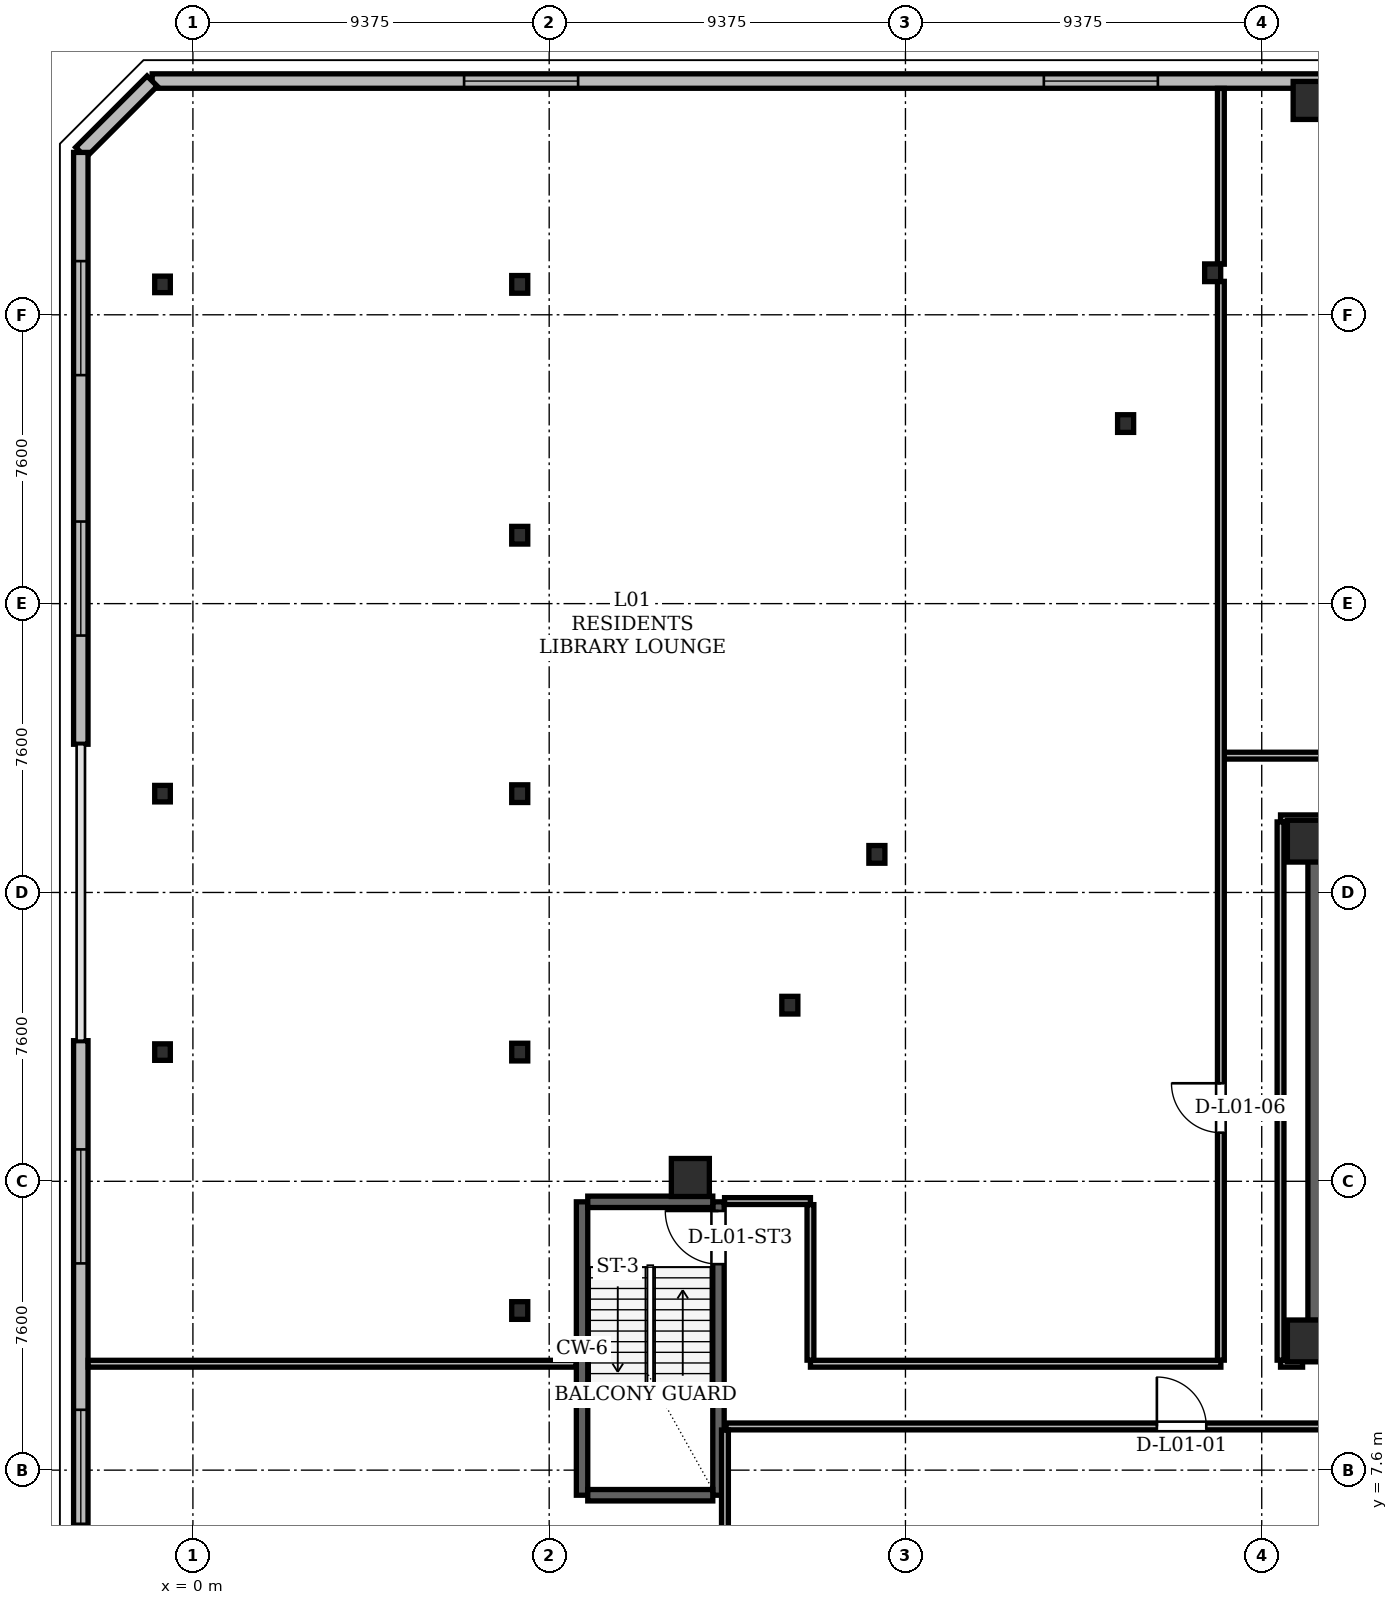
"""IFC4 building model, lengths in metres.
Left out: names, types, materials, properties, quantities, classifications, styles, units other than length and angle.
Written with IfcOpenShell. Run it as: python <this file> out.ifc"""

import sys

from ifc_helpers import new_model, si_unit, direction, frame, frame_2d, origin, origin_2d, place, context, subcontext, project, spatial, rectangle, hollow_rectangle, i_section, extrude, element, fill, save


model = new_model("IFC4")
c1 = context("Model", 3, precision=1e-05, world=origin(), true_north=direction((0.0, 1.0)))
c2 = subcontext(c1, "Body", "Model", "MODEL_VIEW")
j1 = project(units=[si_unit("LENGTHUNIT", "METRE"), si_unit("PLANEANGLEUNIT", "RADIAN")], contexts=[c1])
p1 = place(None, origin())
s1 = spatial("IfcSite", under=j1, at=p1, CompositionType="ELEMENT")
p2 = place(p1, origin())
s2 = spatial("IfcBuilding", under=s1, at=p2, CompositionType="ELEMENT")
p3 = place(p2, frame((0.0, 0.0, 5.4)))
s3 = spatial("IfcBuildingStorey", under=s2, at=p3, CompositionType="ELEMENT", Elevation=5.4)
for number, where, z_axis, x_axis in (
    (1, (29.35, 11.0, 0.0), (0.0, 0.0, 1.0), (1.0, 0.0, 0.0)),
    (2, (29.35, 24.15, 0.0), (0.0, 0.0, 1.0), (1.0, 0.0, 0.0)),
):
    element("IfcColumn", number, at=place(p3, frame(where, z_axis=z_axis, x_axis=x_axis)), inside=s3, PredefinedType="COLUMN", context=c2, shape_type="SweptSolid", body=[
        extrude(hollow_rectangle(XDim=1.1, YDim=1.1, WallThickness=0.09, at=origin_2d()), origin(), (0.0, 0.0, 1.0), 4.5),
    ])
for number, where, z_axis, x_axis in (
    (3, (13.09, 15.3, 0.005), (0.0, 0.0, 1.0), (1.0, 0.0, 0.0)),
    (4, (29.452, 43.64, 0.005), (0.0, 0.0, 1.0), (1.0, 0.0, 0.0)),
):
    element("IfcColumn", number, at=place(p3, frame(where, z_axis=z_axis, x_axis=x_axis)), inside=s3, PredefinedType="COLUMN", context=c2, shape_type="SweptSolid", body=[
        extrude(hollow_rectangle(XDim=1.0, YDim=1.0, WallThickness=0.085, at=origin_2d()), origin(), (0.0, 0.0, 1.0), 4.491),
    ])
for number, where, z_axis, x_axis in (
    (5, (26.834, 39.106, 0.005), (0.0, 0.0, 1.0), (1.0, 0.0, 0.0)),
    (6, (24.543, 35.138, 0.005), (0.0, 0.0, 1.0), (1.0, 0.0, 0.0)),
    (7, (17.998, 23.802, 0.005), (0.0, 0.0, 1.0), (1.0, 0.0, 0.0)),
    (8, (15.708, 19.834, 0.005), (0.0, 0.0, 1.0), (1.0, 0.0, 0.0)),
):
    element("IfcColumn", number, at=place(p3, frame(where, z_axis=z_axis, x_axis=x_axis)), inside=s3, PredefinedType="COLUMN", context=c2, shape_type="SweptSolid", body=[
        extrude(i_section(OverallWidth=0.422, OverallDepth=0.465, WebThickness=0.045, FlangeThickness=0.072, at=origin_2d()), origin(), (0.0, 0.0, 1.0), 4.491),
    ])
for number, where, z_axis, x_axis in (
    (9, (8.6, 11.8, 0.0), (0.0, 0.0, 1.0), (1.0, 0.0, 0.0)),
    (10, (8.6, 18.6, 0.0), (0.0, 0.0, 1.0), (1.0, 0.0, 0.0)),
    (11, (8.6, 25.4, 0.0), (0.0, 0.0, 1.0), (1.0, 0.0, 0.0)),
    (12, (8.6, 32.2, 0.0), (0.0, 0.0, 1.0), (1.0, 0.0, 0.0)),
    (13, (8.6, 38.8, 0.0), (0.0, 0.0, 1.0), (1.0, 0.0, 0.0)),
):
    element("IfcColumn", number, at=place(p3, frame(where, z_axis=z_axis, x_axis=x_axis)), inside=s3, PredefinedType="COLUMN", context=c2, shape_type="SweptSolid", body=[
        extrude(i_section(OverallWidth=0.422, OverallDepth=0.465, WebThickness=0.045, FlangeThickness=0.072, at=origin_2d()), origin(), (0.0, 0.0, 1.0), 4.5),
    ])
for number, where, z_axis, x_axis in (
    (14, (-0.8, 18.6, 0.0), (0.0, 0.0, 1.0), (1.0, 0.0, 0.0)),
    (15, (-0.8, 25.4, 0.0), (0.0, 0.0, 1.0), (1.0, 0.0, 0.0)),
    (16, (-0.8, 38.8, 0.0), (0.0, 0.0, 1.0), (1.0, 0.0, 0.0)),
):
    element("IfcColumn", number, at=place(p3, frame(where, z_axis=z_axis, x_axis=x_axis)), inside=s3, PredefinedType="COLUMN", context=c2, shape_type="SweptSolid", body=[
        extrude(i_section(OverallWidth=0.411, OverallDepth=0.434, WebThickness=0.036, FlangeThickness=0.057, at=origin_2d()), origin(), (0.0, 0.0, 1.0), 4.5),
    ])
p4 = place(p3, frame((29.64, 11.0, 0.0), z_axis=(0.0, 0.0, 1.0), x_axis=(0.0, 1.0, 0.0)))
e17 = element("IfcWall", 17, at=p4, inside=s3, PredefinedType="SHEAR", context=c2, shape_type="SweptSolid", body=[
    extrude(rectangle(XDim=13.3, YDim=0.6, at=frame_2d((6.65, 0.0))), origin(), (0.0, 0.0, 1.0), 4.22),
])
p5 = place(p3, frame((29.35, 11.24, 0.0), z_axis=(0.0, 0.0, 1.0), x_axis=(1.0, 0.0, 0.0)))
e18 = element("IfcWall", 18, at=p5, inside=s3, PredefinedType="SHEAR", context=c2, shape_type="SweptSolid", body=[
    extrude(rectangle(XDim=7.1, YDim=0.6, at=frame_2d((3.55, 0.0))), origin(), (0.0, 0.0, 1.0), 4.22),
])
p6 = place(p3, frame((10.24, 6.94, 0.0), z_axis=(0.0, 0.0, 1.0), x_axis=(0.0, 1.0, 0.0)))
e19 = element("IfcWall", 19, at=p6, inside=s3, PredefinedType="SHEAR", context=c2, shape_type="SweptSolid", body=[
    extrude(rectangle(XDim=7.72, YDim=0.3, at=frame_2d((3.86, 0.0))), origin(), (0.0, 0.0, 1.0), 4.22),
])
p7 = place(p3, frame((13.83, 6.94, 0.0), z_axis=(0.0, 0.0, 1.0), x_axis=(0.0, 1.0, 0.0)))
e20 = element("IfcWall", 20, at=p7, inside=s3, PredefinedType="SHEAR", context=c2, shape_type="SweptSolid", body=[
    extrude(rectangle(XDim=7.72, YDim=0.3, at=frame_2d((3.86, 0.0))), origin(), (0.0, 0.0, 1.0), 4.22),
])
p8 = place(p7, frame((6.08, 0.0, 0.0)))
e21 = element("IfcOpeningElement", 21, at=p8, cuts=e20, PredefinedType="OPENING", context=c2, shape_type="SweptSolid", body=[
    extrude(rectangle(XDim=1.4, YDim=2.2, at=frame_2d((0.7, 1.1))), frame((0.0, 0.15, 0.0), z_axis=(0.0, -1.0, 0.0), x_axis=(1.0, 0.0, 0.0)), (0.0, 0.0, 1.0), 0.3),
])
for number, where, z_axis, x_axis in (
    (22, (10.39, 6.94, 0.0), (0.0, 0.0, 1.0), (1.0, 0.0, 0.0)),
    (23, (10.39, 14.66, 0.0), (0.0, 0.0, 1.0), (1.0, 0.0, 0.0)),
):
    element("IfcWall", number, at=place(p3, frame(where, z_axis=z_axis, x_axis=x_axis)), inside=s3, PredefinedType="SHEAR", context=c2, shape_type="SweptSolid", body=[
        extrude(rectangle(XDim=3.29, YDim=0.3, at=frame_2d((1.645, 0.0))), origin(), (0.0, 0.0, 1.0), 4.22),
    ])
p9 = place(p3, frame((33.6, 44.15, 0.0), z_axis=(0.0, 0.0, 1.0), x_axis=(-1.0, 0.0, 0.0)))
e24 = element("IfcWall", 24, at=p9, inside=s3, PredefinedType="SOLIDWALL", context=c2, shape_type="SweptSolid", body=[
    extrude(rectangle(XDim=34.672, YDim=0.38, at=frame_2d((17.336, 0.0))), origin(), (0.0, 0.0, 1.0), 4.22),
])
p10 = place(p9, frame((8.208, 0.0, 0.85)))
e25 = element("IfcOpeningElement", 25, at=p10, cuts=e24, PredefinedType="OPENING", context=c2, shape_type="SweptSolid", body=[
    extrude(rectangle(XDim=3.0, YDim=2.25, at=frame_2d((1.5, 1.125))), frame((0.0, 0.19, 0.0), z_axis=(0.0, -1.0, 0.0), x_axis=(1.0, 0.0, 0.0)), (0.0, 0.0, 1.0), 0.38),
])
p11 = place(p9, frame((23.464, 0.0, 0.85)))
e26 = element("IfcOpeningElement", 26, at=p11, cuts=e24, PredefinedType="OPENING", context=c2, shape_type="SweptSolid", body=[
    extrude(rectangle(XDim=3.0, YDim=2.25, at=frame_2d((1.5, 1.125))), frame((0.0, 0.19, 0.0), z_axis=(0.0, -1.0, 0.0), x_axis=(1.0, 0.0, 0.0)), (0.0, 0.0, 1.0), 0.38),
])
p12 = place(p3, frame((-1.072, 44.15, 0.0), z_axis=(0.0, 0.0, 1.0), x_axis=(-0.707106781187, -0.707106781187, 0.0)))
e27 = element("IfcWall", 27, at=p12, inside=s3, PredefinedType="SOLIDWALL", context=c2, shape_type="SweptSolid", body=[
    extrude(rectangle(XDim=2.656, YDim=0.38, at=frame_2d((1.328, 0.0))), origin(), (0.0, 0.0, 1.0), 4.22),
])
p13 = place(p3, frame((-2.95, 42.272, 0.0), z_axis=(0.0, 0.0, 1.0), x_axis=(0.0, -1.0, 0.0)))
e28 = element("IfcWall", 28, at=p13, inside=s3, PredefinedType="SOLIDWALL", context=c2, shape_type="SweptSolid", body=[
    extrude(rectangle(XDim=15.572, YDim=0.38, at=frame_2d((7.786, 0.0))), origin(), (0.0, 0.0, 1.0), 4.22),
])
p14 = place(p13, frame((2.86, 0.0, 0.85)))
e29 = element("IfcOpeningElement", 29, at=p14, cuts=e28, PredefinedType="OPENING", context=c2, shape_type="SweptSolid", body=[
    extrude(rectangle(XDim=3.0, YDim=2.25, at=frame_2d((1.5, 1.125))), frame((0.0, 0.19, 0.0), z_axis=(0.0, -1.0, 0.0), x_axis=(1.0, 0.0, 0.0)), (0.0, 0.0, 1.0), 0.38),
])
p15 = place(p13, frame((9.712, 0.0, 0.85)))
e30 = element("IfcOpeningElement", 30, at=p15, cuts=e28, PredefinedType="OPENING", context=c2, shape_type="SweptSolid", body=[
    extrude(rectangle(XDim=3.0, YDim=2.25, at=frame_2d((1.5, 1.125))), frame((0.0, 0.19, 0.0), z_axis=(0.0, -1.0, 0.0), x_axis=(1.0, 0.0, 0.0)), (0.0, 0.0, 1.0), 0.38),
])
p16 = place(p3, frame((-2.95, 18.9, 0.0), z_axis=(0.0, 0.0, 1.0), x_axis=(0.0, -1.0, 0.0)))
e31 = element("IfcWall", 31, at=p16, inside=s3, PredefinedType="SOLIDWALL", context=c2, shape_type="SweptSolid", body=[
    extrude(rectangle(XDim=15.572, YDim=0.38, at=frame_2d((7.786, 0.0))), origin(), (0.0, 0.0, 1.0), 4.22),
])
p17 = place(p16, frame((2.86, 0.0, 0.85)))
e32 = element("IfcOpeningElement", 32, at=p17, cuts=e31, PredefinedType="OPENING", context=c2, shape_type="SweptSolid", body=[
    extrude(rectangle(XDim=3.0, YDim=2.25, at=frame_2d((1.5, 1.125))), frame((0.0, 0.19, 0.0), z_axis=(0.0, -1.0, 0.0), x_axis=(1.0, 0.0, 0.0)), (0.0, 0.0, 1.0), 0.38),
])
p18 = place(p16, frame((9.712, 0.0, 0.85)))
e33 = element("IfcOpeningElement", 33, at=p18, cuts=e31, PredefinedType="OPENING", context=c2, shape_type="SweptSolid", body=[
    extrude(rectangle(XDim=3.0, YDim=2.25, at=frame_2d((1.5, 1.125))), frame((0.0, 0.19, 0.0), z_axis=(0.0, -1.0, 0.0), x_axis=(1.0, 0.0, 0.0)), (0.0, 0.0, 1.0), 0.38),
])
p19 = place(p3, frame((14.03, 8.75, 0.0), z_axis=(0.0, 0.0, 1.0), x_axis=(1.0, 0.0, 0.0)))
e34 = element("IfcWall", 34, at=p19, inside=s3, PredefinedType="PARTITIONING", context=c2, shape_type="SweptSolid", body=[
    extrude(rectangle(XDim=41.57, YDim=0.18, at=frame_2d((20.785, 0.0))), origin(), (0.0, 0.0, 1.0), 3.283),
])
p20 = place(p19, frame((11.336, 0.0, 0.0)))
e35 = element("IfcOpeningElement", 35, at=p20, cuts=e34, PredefinedType="OPENING", context=c2, shape_type="SweptSolid", body=[
    extrude(rectangle(XDim=1.3, YDim=2.2, at=frame_2d((0.65, 1.1))), frame((0.0, 0.09, 0.0), z_axis=(0.0, -1.0, 0.0), x_axis=(1.0, 0.0, 0.0)), (0.0, 0.0, 1.0), 0.18),
])
p21 = place(p19, frame((32.094, 0.0, 0.0)))
e36 = element("IfcOpeningElement", 36, at=p21, cuts=e34, PredefinedType="OPENING", context=c2, shape_type="SweptSolid", body=[
    extrude(rectangle(XDim=1.3, YDim=2.2, at=frame_2d((0.65, 1.1))), frame((0.0, 0.09, 0.0), z_axis=(0.0, -1.0, 0.0), x_axis=(1.0, 0.0, 0.0)), (0.0, 0.0, 1.0), 0.18),
])
p22 = place(p3, frame((-2.756, 10.4, 0.0), z_axis=(0.0, 0.0, 1.0), x_axis=(1.0, 0.0, 0.0)))
e37 = element("IfcWall", 37, at=p22, inside=s3, PredefinedType="PARTITIONING", context=c2, shape_type="SweptSolid", body=[
    extrude(rectangle(XDim=12.836, YDim=0.18, at=frame_2d((6.418, 0.0))), origin(), (0.0, 0.0, 1.0), 2.53),
])
p23 = place(p3, frame((16.25, 10.4, 0.0), z_axis=(0.0, 0.0, 1.0), x_axis=(1.0, 0.0, 0.0)))
e38 = element("IfcWall", 38, at=p23, inside=s3, PredefinedType="PARTITIONING", context=c2, shape_type="SweptSolid", body=[
    extrude(rectangle(XDim=10.8, YDim=0.18, at=frame_2d((5.4, 0.0))), origin(), (0.0, 0.0, 1.0), 4.22),
])
p24 = place(p3, frame((28.62, 10.4, 0.0), z_axis=(0.0, 0.0, 1.0), x_axis=(1.0, 0.0, 0.0)))
e39 = element("IfcWall", 39, at=p24, inside=s3, PredefinedType="PARTITIONING", context=c2, shape_type="SweptSolid", body=[
    extrude(rectangle(XDim=0.58, YDim=0.18, at=frame_2d((0.29, 0.0))), origin(), (0.0, 0.0, 1.0), 3.283),
])
p25 = place(p3, frame((13.99, 14.68, 0.0), z_axis=(0.0, 0.0, 1.0), x_axis=(1.0, 0.0, 0.0)))
e40 = element("IfcWall", 40, at=p25, inside=s3, PredefinedType="PARTITIONING", context=c2, shape_type="SweptSolid", body=[
    extrude(rectangle(XDim=2.26, YDim=0.18, at=frame_2d((1.13, 0.0))), origin(), (0.0, 0.0, 1.0), 3.283),
])
p26 = place(p3, frame((28.62, 24.75, 0.0), z_axis=(0.0, 0.0, 1.0), x_axis=(1.0, 0.0, 0.0)))
e41 = element("IfcWall", 41, at=p26, inside=s3, PredefinedType="PARTITIONING", context=c2, shape_type="SweptSolid", body=[
    extrude(rectangle(XDim=17.76, YDim=0.18, at=frame_2d((8.88, 0.0))), origin(), (0.0, 0.0, 1.0), 3.283),
])
p27 = place(p3, frame((27.05, 26.4, 0.0), z_axis=(0.0, 0.0, 1.0), x_axis=(1.0, 0.0, 0.0)))
e42 = element("IfcWall", 42, at=p27, inside=s3, PredefinedType="PARTITIONING", context=c2, shape_type="SweptSolid", body=[
    extrude(rectangle(XDim=28.55, YDim=0.18, at=frame_2d((14.275, 0.0))), origin(), (0.0, 0.0, 1.0), 3.283),
])
p28 = place(p27, frame((7.425, 0.0, 0.0)))
e43 = element("IfcOpeningElement", 43, at=p28, cuts=e42, PredefinedType="OPENING", context=c2, shape_type="SweptSolid", body=[
    extrude(rectangle(XDim=1.3, YDim=2.2, at=frame_2d((0.65, 1.1))), frame((0.0, 0.09, 0.0), z_axis=(0.0, -1.0, 0.0), x_axis=(1.0, 0.0, 0.0)), (0.0, 0.0, 1.0), 0.18),
])
p29 = place(p27, frame((18.437, 0.0, 0.0)))
e44 = element("IfcOpeningElement", 44, at=p29, cuts=e42, PredefinedType="OPENING", context=c2, shape_type="SweptSolid", body=[
    extrude(rectangle(XDim=0.88, YDim=2.08, at=frame_2d((0.44, 1.04))), frame((0.0, 0.09, 0.0), z_axis=(0.0, -1.0, 0.0), x_axis=(1.0, 0.0, 0.0)), (0.0, 0.0, 1.0), 0.18),
])
p30 = place(p27, frame((23.736, 0.0, 0.0)))
e45 = element("IfcOpeningElement", 45, at=p30, cuts=e42, PredefinedType="OPENING", context=c2, shape_type="SweptSolid", body=[
    extrude(rectangle(XDim=0.88, YDim=2.08, at=frame_2d((0.44, 1.04))), frame((0.0, 0.09, 0.0), z_axis=(0.0, -1.0, 0.0), x_axis=(1.0, 0.0, 0.0)), (0.0, 0.0, 1.0), 0.18),
])
p31 = place(p3, frame((14.0, 1.644, 0.0), z_axis=(0.0, 0.0, 1.0), x_axis=(0.0, 1.0, 0.0)))
e46 = element("IfcWall", 46, at=p31, inside=s3, PredefinedType="PARTITIONING", context=c2, shape_type="SweptSolid", body=[
    extrude(rectangle(XDim=7.012, YDim=0.18, at=frame_2d((3.506, 0.0))), origin(), (0.0, 0.0, 1.0), 4.22),
])
p32 = place(p3, frame((16.25, 10.494, 0.0), z_axis=(0.0, 0.0, 1.0), x_axis=(0.0, 1.0, 0.0)))
e47 = element("IfcWall", 47, at=p32, inside=s3, PredefinedType="PARTITIONING", context=c2, shape_type="SweptSolid", body=[
    extrude(rectangle(XDim=4.092, YDim=0.18, at=frame_2d((2.046, 0.0))), origin(), (0.0, 0.0, 1.0), 3.283),
])
p33 = place(p3, frame((27.05, 10.494, 0.0), z_axis=(0.0, 0.0, 1.0), x_axis=(0.0, 1.0, 0.0)))
e48 = element("IfcWall", 48, at=p33, inside=s3, PredefinedType="PARTITIONING", context=c2, shape_type="SweptSolid", body=[
    extrude(rectangle(XDim=28.386, YDim=0.18, at=frame_2d((14.193, 0.0))), origin(), (0.0, 0.0, 1.0), 3.283),
])
p34 = place(p33, frame((5.985, 0.0, 0.0)))
e49 = element("IfcOpeningElement", 49, at=p34, cuts=e48, PredefinedType="OPENING", context=c2, shape_type="SweptSolid", body=[
    extrude(rectangle(XDim=1.3, YDim=2.2, at=frame_2d((0.65, 1.1))), frame((0.0, 0.09, 0.0), z_axis=(0.0, -1.0, 0.0), x_axis=(1.0, 0.0, 0.0)), (0.0, 0.0, 1.0), 0.18),
])
p35 = place(p3, frame((27.05, 39.332, 0.0), z_axis=(0.0, 0.0, 1.0), x_axis=(0.0, 1.0, 0.0)))
e50 = element("IfcWall", 50, at=p35, inside=s3, PredefinedType="PARTITIONING", context=c2, shape_type="SweptSolid", body=[
    extrude(rectangle(XDim=4.625, YDim=0.18, at=frame_2d((2.312, 0.0))), origin(), (0.0, 0.0, 1.0), 3.354),
])
p36 = place(p3, frame((28.62, 10.494, 0.0), z_axis=(0.0, 0.0, 1.0), x_axis=(0.0, 1.0, 0.0)))
e51 = element("IfcWall", 51, at=p36, inside=s3, PredefinedType="PARTITIONING", context=c2, shape_type="SweptSolid", body=[
    extrude(rectangle(XDim=14.162, YDim=0.18, at=frame_2d((7.081, 0.0))), origin(), (0.0, 0.0, 1.0), 3.283),
])
p37 = place(p10, origin())
e52 = element("IfcWindow", 52, at=p37, inside=s3, PartitioningType="SINGLE_PANEL", PredefinedType="WINDOW", context=c2, shape_type="SweptSolid", body=[
    extrude(rectangle(XDim=3.0, YDim=2.25, at=frame_2d((1.5, 1.125))), frame((0.0, 0.03, 0.0), z_axis=(0.0, -1.0, 0.0), x_axis=(1.0, 0.0, 0.0)), (0.0, 0.0, 1.0), 0.06),
])
fill(e25, e52)
p38 = place(p11, origin())
e53 = element("IfcWindow", 53, at=p38, inside=s3, PartitioningType="SINGLE_PANEL", PredefinedType="WINDOW", context=c2, shape_type="SweptSolid", body=[
    extrude(rectangle(XDim=3.0, YDim=2.25, at=frame_2d((1.5, 1.125))), frame((0.0, 0.03, 0.0), z_axis=(0.0, -1.0, 0.0), x_axis=(1.0, 0.0, 0.0)), (0.0, 0.0, 1.0), 0.06),
])
fill(e26, e53)
p39 = place(p14, origin())
e54 = element("IfcWindow", 54, at=p39, inside=s3, PartitioningType="SINGLE_PANEL", PredefinedType="WINDOW", context=c2, shape_type="SweptSolid", body=[
    extrude(rectangle(XDim=3.0, YDim=2.25, at=frame_2d((1.5, 1.125))), frame((0.0, 0.03, 0.0), z_axis=(0.0, -1.0, 0.0), x_axis=(1.0, 0.0, 0.0)), (0.0, 0.0, 1.0), 0.06),
])
fill(e29, e54)
p40 = place(p15, origin())
e55 = element("IfcWindow", 55, at=p40, inside=s3, PartitioningType="SINGLE_PANEL", PredefinedType="WINDOW", context=c2, shape_type="SweptSolid", body=[
    extrude(rectangle(XDim=3.0, YDim=2.25, at=frame_2d((1.5, 1.125))), frame((0.0, 0.03, 0.0), z_axis=(0.0, -1.0, 0.0), x_axis=(1.0, 0.0, 0.0)), (0.0, 0.0, 1.0), 0.06),
])
fill(e30, e55)
p41 = place(p17, origin())
e56 = element("IfcWindow", 56, at=p41, inside=s3, PartitioningType="SINGLE_PANEL", PredefinedType="WINDOW", context=c2, shape_type="SweptSolid", body=[
    extrude(rectangle(XDim=3.0, YDim=2.25, at=frame_2d((1.5, 1.125))), frame((0.0, 0.03, 0.0), z_axis=(0.0, -1.0, 0.0), x_axis=(1.0, 0.0, 0.0)), (0.0, 0.0, 1.0), 0.06),
])
fill(e32, e56)
p42 = place(p18, origin())
e57 = element("IfcWindow", 57, at=p42, inside=s3, PartitioningType="SINGLE_PANEL", PredefinedType="WINDOW", context=c2, shape_type="SweptSolid", body=[
    extrude(rectangle(XDim=3.0, YDim=2.25, at=frame_2d((1.5, 1.125))), frame((0.0, 0.03, 0.0), z_axis=(0.0, -1.0, 0.0), x_axis=(1.0, 0.0, 0.0)), (0.0, 0.0, 1.0), 0.06),
])
fill(e33, e57)
p43 = place(p8, origin())
e58 = element("IfcDoor", 58, at=p43, inside=s3, OperationType="SINGLE_SWING_RIGHT", PredefinedType="DOOR", context=c2, shape_type="SweptSolid", body=[
    extrude(rectangle(XDim=1.4, YDim=2.2, at=frame_2d((0.7, 1.1))), frame((0.0, 0.025, 0.0), z_axis=(0.0, -1.0, 0.0), x_axis=(1.0, 0.0, 0.0)), (0.0, 0.0, 1.0), 0.05),
])
fill(e21, e58)
p44 = place(p20, origin())
e59 = element("IfcDoor", 59, at=p44, inside=s3, OperationType="SINGLE_SWING_LEFT", PredefinedType="DOOR", context=c2, shape_type="SweptSolid", body=[
    extrude(rectangle(XDim=1.3, YDim=2.2, at=frame_2d((0.65, 1.1))), frame((0.0, 0.025, 0.0), z_axis=(0.0, -1.0, 0.0), x_axis=(1.0, 0.0, 0.0)), (0.0, 0.0, 1.0), 0.05),
])
fill(e35, e59)
p45 = place(p34, origin())
e60 = element("IfcDoor", 60, at=p45, inside=s3, OperationType="SINGLE_SWING_RIGHT", PredefinedType="DOOR", context=c2, shape_type="SweptSolid", body=[
    extrude(rectangle(XDim=1.3, YDim=2.2, at=frame_2d((0.65, 1.1))), frame((0.0, 0.025, 0.0), z_axis=(0.0, -1.0, 0.0), x_axis=(1.0, 0.0, 0.0)), (0.0, 0.0, 1.0), 0.05),
])
fill(e49, e60)
save(model, sys.argv[1])
